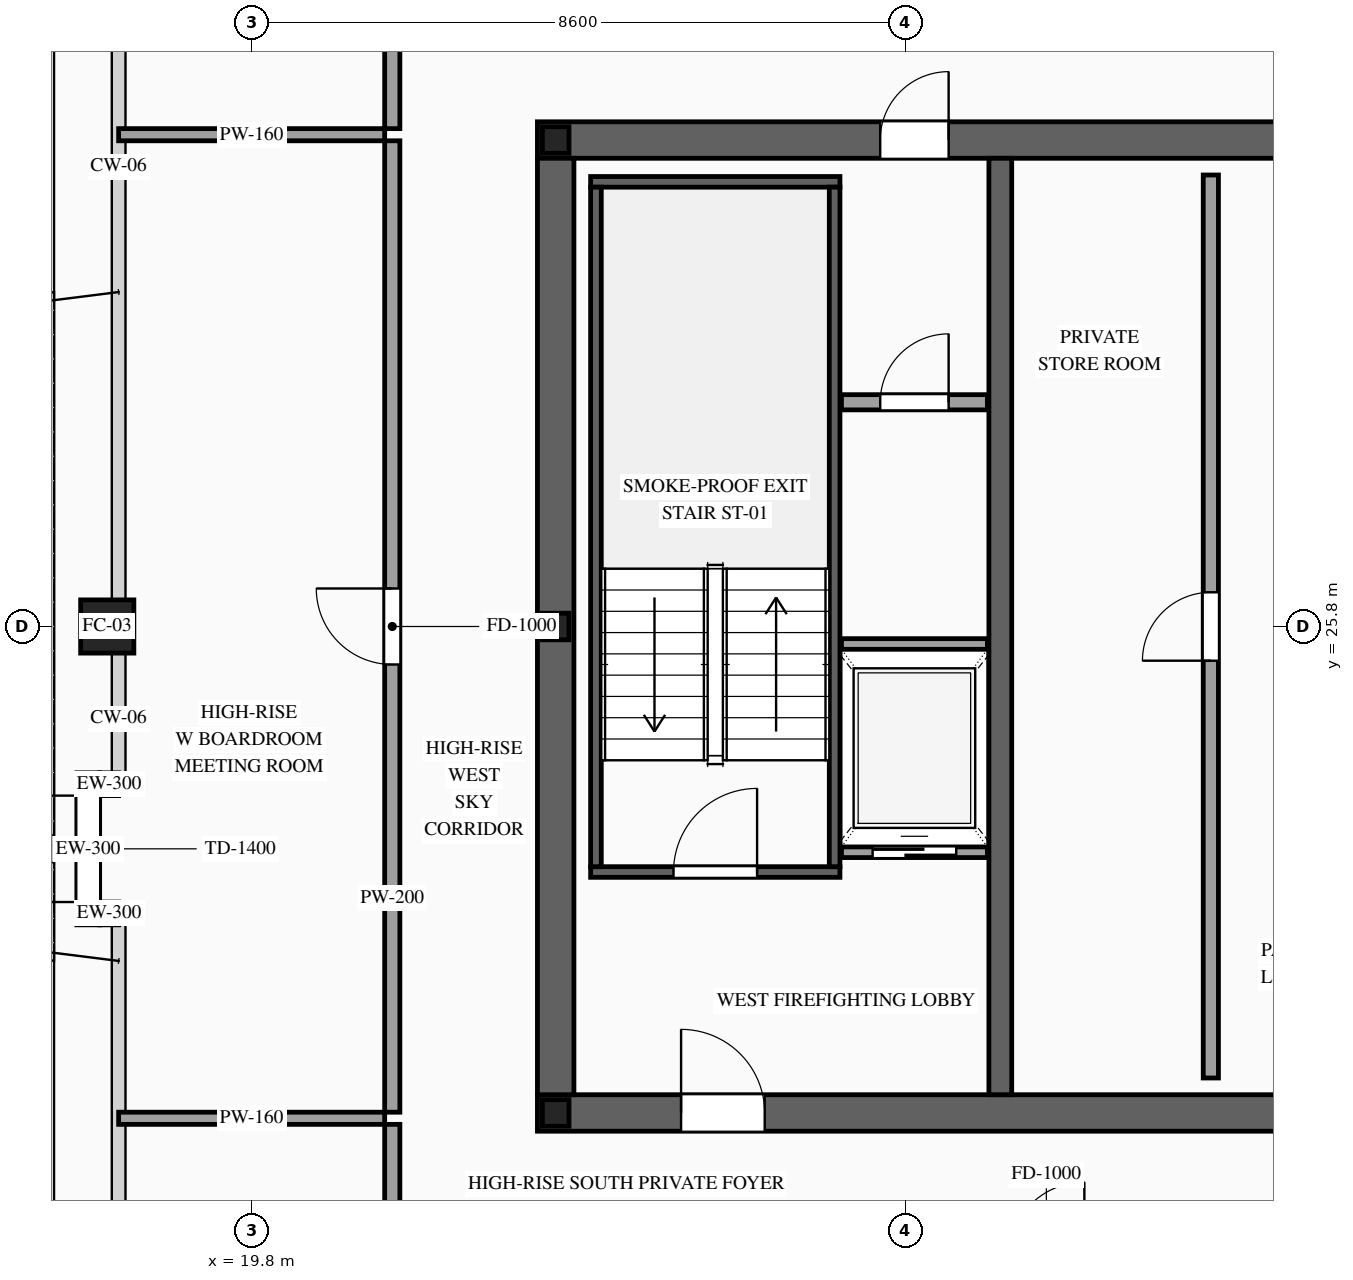
"""IFC4 building model, lengths in metres.
Left out: names, types, materials, properties, quantities, classifications, styles, units other than length and angle.
Written with IfcOpenShell. Run it as: python <this file> out.ifc"""

import sys

from ifc_helpers import new_model, si_unit, direction, frame, frame_2d, origin, origin_2d, place, context, subcontext, project, spatial, rectangle, hollow_rectangle, i_section, extrude, source, transform, mapped, element, fill, save


model = new_model("IFC4")
c1 = context("Model", 3, precision=1e-05, world=origin(), true_north=direction((0.0, 1.0)))
c2 = subcontext(c1, "Body", "Model", "MODEL_VIEW")
j1 = project(units=[si_unit("LENGTHUNIT", "METRE"), si_unit("PLANEANGLEUNIT", "RADIAN")], contexts=[c1])
p1 = place(None, origin())
s1 = spatial("IfcSite", under=j1, at=p1, CompositionType="ELEMENT")
p2 = place(p1, origin())
s2 = spatial("IfcBuilding", under=s1, at=p2, CompositionType="ELEMENT")
p3 = place(p2, frame((0.0, 0.0, 321.7)))
s3 = spatial("IfcBuildingStorey", under=s2, at=p3, CompositionType="ELEMENT", Elevation=321.7)
p4 = place(p3, frame((23.56, 19.4, 0.0), z_axis=(0.0, 0.0, 1.0), x_axis=(1.0, 0.0, 0.0)))
e1 = element("IfcWall", 1, at=p4, inside=s3, PredefinedType="SHEAR", context=c2, shape_type="SweptSolid", body=[
    extrude(rectangle(XDim=26.88, YDim=0.48, at=frame_2d((13.44, 0.0))), origin(), (0.0, 0.0, 1.0), 3.5),
])
p5 = place(p4, frame((1.89, 0.0, 0.0)))
e2 = element("IfcOpeningElement", 2, at=p5, cuts=e1, PredefinedType="OPENING", context=c2, shape_type="SweptSolid", body=[
    extrude(rectangle(XDim=1.1, YDim=2.2, at=frame_2d((0.55, 1.1))), frame((0.0, 0.255, 0.0), z_axis=(0.0, -1.0, 0.0), x_axis=(1.0, 0.0, 0.0)), (0.0, 0.0, 1.0), 0.51),
])
p6 = place(p4, frame((9.79, 0.0, 0.0)))
e3 = element("IfcOpeningElement", 3, at=p6, cuts=e1, PredefinedType="OPENING", context=c2, shape_type="SweptSolid", body=[
    extrude(rectangle(XDim=1.1, YDim=2.2, at=frame_2d((0.55, 1.1))), frame((0.0, 0.255, 0.0), z_axis=(0.0, -1.0, 0.0), x_axis=(1.0, 0.0, 0.0)), (0.0, 0.0, 1.0), 0.51),
])
p7 = place(p4, frame((22.99, 0.0, 0.0)))
e4 = element("IfcOpeningElement", 4, at=p7, cuts=e1, PredefinedType="OPENING", context=c2, shape_type="SweptSolid", body=[
    extrude(rectangle(XDim=1.1, YDim=2.2, at=frame_2d((0.55, 1.1))), frame((0.0, 0.255, 0.0), z_axis=(0.0, -1.0, 0.0), x_axis=(1.0, 0.0, 0.0)), (0.0, 0.0, 1.0), 0.51),
])
p8 = place(p4, frame((19.61, 0.0, 0.0)))
e5 = element("IfcOpeningElement", 5, at=p8, cuts=e1, PredefinedType="OPENING", context=c2, shape_type="SweptSolid", body=[
    extrude(rectangle(XDim=0.9, YDim=2.15, at=frame_2d((0.45, 1.075))), frame((0.0, 0.255, 0.0), z_axis=(0.0, -1.0, 0.0), x_axis=(1.0, 0.0, 0.0)), (0.0, 0.0, 1.0), 0.51),
])
p9 = place(p4, frame((18.17, 0.0, 0.0)))
e6 = element("IfcOpeningElement", 6, at=p9, cuts=e1, PredefinedType="OPENING", context=c2, shape_type="SweptSolid", body=[
    extrude(rectangle(XDim=0.9, YDim=2.15, at=frame_2d((0.45, 1.075))), frame((0.0, 0.255, 0.0), z_axis=(0.0, -1.0, 0.0), x_axis=(1.0, 0.0, 0.0)), (0.0, 0.0, 1.0), 0.51),
])
p10 = place(p3, frame((23.56, 32.2, 0.0), z_axis=(0.0, 0.0, 1.0), x_axis=(1.0, 0.0, 0.0)))
e7 = element("IfcWall", 7, at=p10, inside=s3, PredefinedType="SHEAR", context=c2, shape_type="SweptSolid", body=[
    extrude(rectangle(XDim=26.88, YDim=0.48, at=frame_2d((13.44, 0.0))), origin(), (0.0, 0.0, 1.0), 3.5),
])
p11 = place(p10, frame((4.51, 0.0, 0.0)))
e8 = element("IfcOpeningElement", 8, at=p11, cuts=e7, PredefinedType="OPENING", context=c2, shape_type="SweptSolid", body=[
    extrude(rectangle(XDim=0.9, YDim=2.15, at=frame_2d((0.45, 1.075))), frame((0.0, 0.255, 0.0), z_axis=(0.0, -1.0, 0.0), x_axis=(1.0, 0.0, 0.0)), (0.0, 0.0, 1.0), 0.51),
])
p12 = place(p10, frame((9.79, 0.0, 0.0)))
e9 = element("IfcOpeningElement", 9, at=p12, cuts=e7, PredefinedType="OPENING", context=c2, shape_type="SweptSolid", body=[
    extrude(rectangle(XDim=1.1, YDim=2.2, at=frame_2d((0.55, 1.1))), frame((0.0, 0.255, 0.0), z_axis=(0.0, -1.0, 0.0), x_axis=(1.0, 0.0, 0.0)), (0.0, 0.0, 1.0), 0.51),
])
p13 = place(p10, frame((15.64, 0.0, 0.0)))
e10 = element("IfcOpeningElement", 10, at=p13, cuts=e7, PredefinedType="OPENING", context=c2, shape_type="SweptSolid", body=[
    extrude(rectangle(XDim=1.1, YDim=2.2, at=frame_2d((0.55, 1.1))), frame((0.0, 0.255, 0.0), z_axis=(0.0, -1.0, 0.0), x_axis=(1.0, 0.0, 0.0)), (0.0, 0.0, 1.0), 0.51),
])
p14 = place(p10, frame((18.74, 0.0, 0.0)))
e11 = element("IfcOpeningElement", 11, at=p14, cuts=e7, PredefinedType="OPENING", context=c2, shape_type="SweptSolid", body=[
    extrude(rectangle(XDim=1.1, YDim=2.2, at=frame_2d((0.55, 1.1))), frame((0.0, 0.255, 0.0), z_axis=(0.0, -1.0, 0.0), x_axis=(1.0, 0.0, 0.0)), (0.0, 0.0, 1.0), 0.51),
])
m1 = source(origin(), c2, "Body", "SweptSolid", [
    extrude(rectangle(XDim=12.32, YDim=0.48, at=frame_2d((6.16, 0.0))), origin(), (0.0, 0.0, 1.0), 3.5),
])
p15 = place(p3, frame((23.8, 19.64, 0.0), z_axis=(0.0, 0.0, 1.0), x_axis=(0.0, 1.0, 0.0)))
e12 = element("IfcWall", 12, at=p15, inside=s3, PredefinedType="SHEAR", context=c2, shape_type="MappedRepresentation", body=[
    mapped(m1, transform((0.0, 0.0, 0.0), scale=1.0)),
])
m2 = source(origin(), c2, "Body", "SweptSolid", [
    extrude(rectangle(XDim=12.32, YDim=0.3, at=frame_2d((6.16, 0.0))), origin(), (0.0, 0.0, 1.0), 3.5),
])
p16 = place(p3, frame((29.65, 19.64, 0.0), z_axis=(0.0, 0.0, 1.0), x_axis=(0.0, 1.0, 0.0)))
e13 = element("IfcWall", 13, at=p16, inside=s3, PredefinedType="SOLIDWALL", context=c2, shape_type="MappedRepresentation", body=[
    mapped(m2, transform((0.0, 0.0, 0.0), scale=1.0)),
])
m3 = source(origin(), c2, "Body", "SweptSolid", [
    extrude(i_section(OverallWidth=0.35, OverallDepth=0.35, WebThickness=0.012, FlangeThickness=0.019, at=origin_2d()), origin(), (0.0, 0.0, 1.0), 3.5),
])
for number, where, z_axis, x_axis in (
    (14, (23.8, 19.4, 0.0), (0.0, 0.0, 1.0), (1.0, 0.0, 0.0)),
    (15, (23.8, 25.8, 0.0), (0.0, 0.0, 1.0), (1.0, 0.0, 0.0)),
    (16, (23.8, 32.2, 0.0), (0.0, 0.0, 1.0), (1.0, 0.0, 0.0)),
):
    element("IfcColumn", number, at=place(p3, frame(where, z_axis=z_axis, x_axis=x_axis)), inside=s3, PredefinedType="COLUMN", context=c2, shape_type="MappedRepresentation", body=[
        mapped(m3, transform((0.0, 0.0, 0.0), scale=1.0)),
    ])
m4 = source(origin(), c2, "Body", "SweptSolid", [
    extrude(hollow_rectangle(XDim=0.7, YDim=0.7, WallThickness=0.032, at=origin_2d()), origin(), (0.0, 0.0, 1.0), 3.5),
])
p17 = place(p3, frame((17.9, 25.8, 0.0), z_axis=(0.0, 0.0, 1.0), x_axis=(1.0, 0.0, 0.0)))
e17 = element("IfcColumn", 17, at=p17, inside=s3, PredefinedType="COLUMN", context=c2, shape_type="MappedRepresentation", body=[
    mapped(m4, transform((0.0, 0.0, 0.0), scale=1.0)),
])
p18 = place(p3, frame((17.65, 21.875, 0.0), z_axis=(0.0, 0.0, 1.0), x_axis=(0.0, 1.0, 0.0)))
e18 = element("IfcWall", 18, at=p18, inside=s3, PredefinedType="SOLIDWALL", context=c2, shape_type="SweptSolid", body=[
    extrude(rectangle(XDim=2.0, YDim=0.3, at=frame_2d((1.0, 0.0))), origin(), (0.0, 0.0, 1.0), 2.885),
])
p19 = place(p18, frame((0.3, 0.0, 0.0)))
e19 = element("IfcOpeningElement", 19, at=p19, cuts=e18, PredefinedType="OPENING", context=c2, shape_type="SweptSolid", body=[
    extrude(rectangle(XDim=1.4, YDim=2.3, at=frame_2d((0.7, 1.15))), frame((0.0, 0.165, 0.0), z_axis=(0.0, -1.0, 0.0), x_axis=(1.0, 0.0, 0.0)), (0.0, 0.0, 1.0), 0.33),
])
m5 = source(origin(), c2, "Body", "SweptSolid", [
    extrude(rectangle(XDim=0.25, YDim=0.3, at=frame_2d((0.125, 0.0))), origin(), (0.0, 0.0, 1.0), 3.28),
])
for number, where, z_axis, x_axis in (
    (20, (18.05, 22.025, 0.0), (0.0, 0.0, 1.0), (-1.0, 0.0, 0.0)),
    (21, (17.8, 23.725, 0.0), (0.0, 0.0, 1.0), (1.0, 0.0, 0.0)),
):
    element("IfcWall", number, at=place(p3, frame(where, z_axis=z_axis, x_axis=x_axis)), inside=s3, PredefinedType="SOLIDWALL", context=c2, shape_type="MappedRepresentation", body=[
        mapped(m5, transform((0.0, 0.0, 0.0), scale=1.0)),
    ])
p20 = place(p3, frame((27.56, 22.83, 0.0), z_axis=(0.0, 0.0, 1.0), x_axis=(1.0, 0.0, 0.0)))
e22 = element("IfcWall", 22, at=p20, inside=s3, PredefinedType="SOLIDWALL", context=c2, shape_type="SweptSolid", body=[
    extrude(rectangle(XDim=1.92, YDim=0.14, at=frame_2d((0.96, 0.0))), origin(), (0.0, 0.0, 1.0), 3.28),
])
p21 = place(p20, frame((0.41, 0.0, 0.0)))
e23 = element("IfcOpeningElement", 23, at=p21, cuts=e22, PredefinedType="OPENING", context=c2, shape_type="SweptSolid", body=[
    extrude(rectangle(XDim=1.1, YDim=2.2, at=frame_2d((0.55, 1.1))), frame((0.0, 0.085, 0.0), z_axis=(0.0, -1.0, 0.0), x_axis=(1.0, 0.0, 0.0)), (0.0, 0.0, 1.0), 0.17),
])
m6 = source(origin(), c2, "Body", "SweptSolid", [
    extrude(rectangle(XDim=1.92, YDim=0.14, at=frame_2d((0.96, 0.0))), origin(), (0.0, 0.0, 1.0), 3.28),
])
p22 = place(p3, frame((27.56, 25.57, 0.0), z_axis=(0.0, 0.0, 1.0), x_axis=(1.0, 0.0, 0.0)))
e24 = element("IfcWall", 24, at=p22, inside=s3, PredefinedType="SOLIDWALL", context=c2, shape_type="MappedRepresentation", body=[
    mapped(m6, transform((0.0, 0.0, 0.0), scale=1.0)),
])
p23 = place(p3, frame((24.26, 22.57, 0.0), z_axis=(0.0, 0.0, 1.0), x_axis=(1.0, 0.0, 0.0)))
e25 = element("IfcWall", 25, at=p23, inside=s3, PredefinedType="SOLIDWALL", context=c2, shape_type="SweptSolid", body=[
    extrude(rectangle(XDim=3.28, YDim=0.14, at=frame_2d((1.64, 0.0))), origin(), (0.0, 0.0, 1.0), 3.28),
])
p24 = place(p23, frame((1.09, 0.0, 0.0)))
e26 = element("IfcOpeningElement", 26, at=p24, cuts=e25, PredefinedType="OPENING", context=c2, shape_type="SweptSolid", body=[
    extrude(rectangle(XDim=1.1, YDim=2.2, at=frame_2d((0.55, 1.1))), frame((0.0, 0.085, 0.0), z_axis=(0.0, -1.0, 0.0), x_axis=(1.0, 0.0, 0.0)), (0.0, 0.0, 1.0), 0.17),
])
m7 = source(origin(), c2, "Body", "SweptSolid", [
    extrude(rectangle(XDim=3.28, YDim=0.14, at=frame_2d((1.64, 0.0))), origin(), (0.0, 0.0, 1.0), 3.28),
])
p25 = place(p3, frame((24.26, 31.65, 0.0), z_axis=(0.0, 0.0, 1.0), x_axis=(1.0, 0.0, 0.0)))
e27 = element("IfcWall", 27, at=p25, inside=s3, PredefinedType="SOLIDWALL", context=c2, shape_type="MappedRepresentation", body=[
    mapped(m7, transform((0.0, 0.0, 0.0), scale=1.0)),
])
m8 = source(origin(), c2, "Body", "SweptSolid", [
    extrude(rectangle(XDim=8.94, YDim=0.14, at=frame_2d((4.47, 0.0))), origin(), (0.0, 0.0, 1.0), 3.28),
])
for number, where, z_axis, x_axis in (
    (28, (24.33, 22.64, 0.0), (0.0, 0.0, 1.0), (0.0, 1.0, 0.0)),
    (29, (27.47, 22.64, 0.0), (0.0, 0.0, 1.0), (0.0, 1.0, 0.0)),
):
    element("IfcWall", number, at=place(p3, frame(where, z_axis=z_axis, x_axis=x_axis)), inside=s3, PredefinedType="SOLIDWALL", context=c2, shape_type="MappedRepresentation", body=[
        mapped(m8, transform((0.0, 0.0, 0.0), scale=1.0)),
    ])
p26 = place(p3, frame((27.56, 28.75, 0.0), z_axis=(0.0, 0.0, 1.0), x_axis=(1.0, 0.0, 0.0)))
e30 = element("IfcWall", 30, at=p26, inside=s3, PredefinedType="PARTITIONING", context=c2, shape_type="SweptSolid", body=[
    extrude(rectangle(XDim=1.92, YDim=0.2, at=frame_2d((0.96, 0.0))), origin(), (0.0, 0.0, 1.0), 3.28),
])
p27 = place(p26, frame((0.51, 0.0, 0.0)))
e31 = element("IfcOpeningElement", 31, at=p27, cuts=e30, PredefinedType="OPENING", context=c2, shape_type="SweptSolid", body=[
    extrude(rectangle(XDim=0.9, YDim=2.15, at=frame_2d((0.45, 1.075))), frame((0.0, 0.115, 0.0), z_axis=(0.0, -1.0, 0.0), x_axis=(1.0, 0.0, 0.0)), (0.0, 0.0, 1.0), 0.23),
])
p28 = place(p3, frame((32.42, 19.86, 0.0), z_axis=(0.0, 0.0, 1.0), x_axis=(0.0, 1.0, 0.0)))
e32 = element("IfcWall", 32, at=p28, inside=s3, PredefinedType="PARTITIONING", context=c2, shape_type="SweptSolid", body=[
    extrude(rectangle(XDim=11.88, YDim=0.2, at=frame_2d((5.94, 0.0))), origin(), (0.0, 0.0, 1.0), 3.28),
])
p29 = place(p28, frame((5.49, 0.0, 0.0)))
e33 = element("IfcOpeningElement", 33, at=p29, cuts=e32, PredefinedType="OPENING", context=c2, shape_type="SweptSolid", body=[
    extrude(rectangle(XDim=0.9, YDim=2.15, at=frame_2d((0.45, 1.075))), frame((0.0, 0.115, 0.0), z_axis=(0.0, -1.0, 0.0), x_axis=(1.0, 0.0, 0.0)), (0.0, 0.0, 1.0), 0.23),
])
m9 = source(origin(), c2, "Body", "SweptSolid", [
    extrude(rectangle(XDim=1.7, YDim=0.2, at=frame_2d((0.85, 0.0))), origin(), (0.0, 0.0, 1.0), 3.28),
])
for number, where, z_axis, x_axis in (
    (34, (21.65, 32.35, 0.0), (0.0, 0.0, 1.0), (0.0, 1.0, 0.0)),
    (35, (21.65, 17.55, 0.0), (0.0, 0.0, 1.0), (0.0, 1.0, 0.0)),
):
    element("IfcWall", number, at=place(p3, frame(where, z_axis=z_axis, x_axis=x_axis)), inside=s3, PredefinedType="PARTITIONING", context=c2, shape_type="MappedRepresentation", body=[
        mapped(m9, transform((0.0, 0.0, 0.0), scale=1.0)),
    ])
p30 = place(p3, frame((21.65, 19.41, 0.0), z_axis=(0.0, 0.0, 1.0), x_axis=(0.0, 1.0, 0.0)))
e36 = element("IfcWall", 36, at=p30, inside=s3, PredefinedType="PARTITIONING", context=c2, shape_type="SweptSolid", body=[
    extrude(rectangle(XDim=12.78, YDim=0.2, at=frame_2d((6.39, 0.0))), origin(), (0.0, 0.0, 1.0), 3.28),
])
p31 = place(p30, frame((5.89, 0.0, 0.0)))
e37 = element("IfcOpeningElement", 37, at=p31, cuts=e36, PredefinedType="OPENING", context=c2, shape_type="SweptSolid", body=[
    extrude(rectangle(XDim=1.0, YDim=2.2, at=frame_2d((0.5, 1.1))), frame((0.0, 0.115, 0.0), z_axis=(0.0, -1.0, 0.0), x_axis=(1.0, 0.0, 0.0)), (0.0, 0.0, 1.0), 0.23),
])
m10 = source(origin(), c2, "Body", "SweptSolid", [
    extrude(rectangle(XDim=3.5, YDim=0.16, at=frame_2d((1.75, 0.0))), origin(), (0.0, 0.0, 1.0), 2.825),
])
for number, where, z_axis, x_axis in (
    (38, (18.05, 19.33, 0.0), (0.0, 0.0, 1.0), (1.0, 0.0, 0.0)),
    (39, (18.05, 32.27, 0.0), (0.0, 0.0, 1.0), (1.0, 0.0, 0.0)),
):
    element("IfcWall", number, at=place(p3, frame(where, z_axis=z_axis, x_axis=x_axis)), inside=s3, PredefinedType="PARTITIONING", context=c2, shape_type="MappedRepresentation", body=[
        mapped(m10, transform((0.0, 0.0, 0.0), scale=1.0)),
    ])
m11 = source(origin(), c2, "Body", "SweptSolid", [
    extrude(rectangle(XDim=1.4, YDim=2.3, at=frame_2d((0.7, 1.15))), frame((0.0, 0.025, 0.0), z_axis=(0.0, -1.0, 0.0), x_axis=(1.0, 0.0, 0.0)), (0.0, 0.0, 1.0), 0.05),
])
p32 = place(p19, origin())
e40 = element("IfcDoor", 40, at=p32, inside=s3, OperationType="DOUBLE_DOOR_SINGLE_SWING", PredefinedType="DOOR", context=c2, shape_type="MappedRepresentation", body=[
    mapped(m11, transform((0.0, 0.0, 0.0), scale=1.0)),
])
fill(e19, e40)
m12 = source(origin(), c2, "Body", "SweptSolid", [
    extrude(rectangle(XDim=1.1, YDim=2.2, at=frame_2d((0.55, 1.1))), frame((0.0, 0.025, 0.0), z_axis=(0.0, -1.0, 0.0), x_axis=(1.0, 0.0, 0.0)), (0.0, 0.0, 1.0), 0.05),
])
p33 = place(p21, origin())
e41 = element("IfcDoor", 41, at=p33, inside=s3, OperationType="SLIDING_TO_LEFT", PredefinedType="DOOR", context=c2, shape_type="MappedRepresentation", body=[
    mapped(m12, transform((0.0, 0.0, 0.0), scale=1.0)),
])
fill(e23, e41)
m13 = source(origin(), c2, "Body", "SweptSolid", [
    extrude(rectangle(XDim=1.1, YDim=2.2, at=frame_2d((0.55, 1.1))), frame((0.0, 0.025, 0.0), z_axis=(0.0, -1.0, 0.0), x_axis=(1.0, 0.0, 0.0)), (0.0, 0.0, 1.0), 0.05),
])
p34 = place(p24, origin())
e42 = element("IfcDoor", 42, at=p34, inside=s3, OperationType="SINGLE_SWING_RIGHT", PredefinedType="DOOR", context=c2, shape_type="MappedRepresentation", body=[
    mapped(m13, transform((0.0, 0.0, 0.0), scale=1.0)),
])
fill(e26, e42)
p35 = place(p5, origin())
e43 = element("IfcDoor", 43, at=p35, inside=s3, OperationType="SINGLE_SWING_LEFT", PredefinedType="DOOR", context=c2, shape_type="MappedRepresentation", body=[
    mapped(m13, transform((0.0, 0.0, 0.0), scale=1.0)),
])
fill(e2, e43)
m14 = source(origin(), c2, "Body", "SweptSolid", [
    extrude(rectangle(XDim=0.9, YDim=2.15, at=frame_2d((0.45, 1.075))), frame((0.0, 0.025, 0.0), z_axis=(0.0, -1.0, 0.0), x_axis=(1.0, 0.0, 0.0)), (0.0, 0.0, 1.0), 0.05),
])
p36 = place(p11, origin())
e44 = element("IfcDoor", 44, at=p36, inside=s3, OperationType="SINGLE_SWING_RIGHT", PredefinedType="DOOR", context=c2, shape_type="MappedRepresentation", body=[
    mapped(m14, transform((0.0, 0.0, 0.0), scale=1.0)),
])
fill(e8, e44)
p37 = place(p27, origin())
e45 = element("IfcDoor", 45, at=p37, inside=s3, OperationType="SINGLE_SWING_RIGHT", PredefinedType="DOOR", context=c2, shape_type="MappedRepresentation", body=[
    mapped(m14, transform((0.0, 0.0, 0.0), scale=1.0)),
])
fill(e31, e45)
p38 = place(p29, origin())
e46 = element("IfcDoor", 46, at=p38, inside=s3, OperationType="SINGLE_SWING_LEFT", PredefinedType="DOOR", context=c2, shape_type="MappedRepresentation", body=[
    mapped(m14, transform((0.0, 0.0, 0.0), scale=1.0)),
])
fill(e33, e46)
m15 = source(origin(), c2, "Body", "SweptSolid", [
    extrude(rectangle(XDim=1.0, YDim=2.2, at=frame_2d((0.5, 1.1))), frame((0.0, 0.025, 0.0), z_axis=(0.0, -1.0, 0.0), x_axis=(1.0, 0.0, 0.0)), (0.0, 0.0, 1.0), 0.05),
])
p39 = place(p31, origin())
e47 = element("IfcDoor", 47, at=p39, inside=s3, OperationType="SINGLE_SWING_RIGHT", PredefinedType="DOOR", context=c2, shape_type="MappedRepresentation", body=[
    mapped(m15, transform((0.0, 0.0, 0.0), scale=1.0)),
])
fill(e37, e47)
save(model, sys.argv[1])
